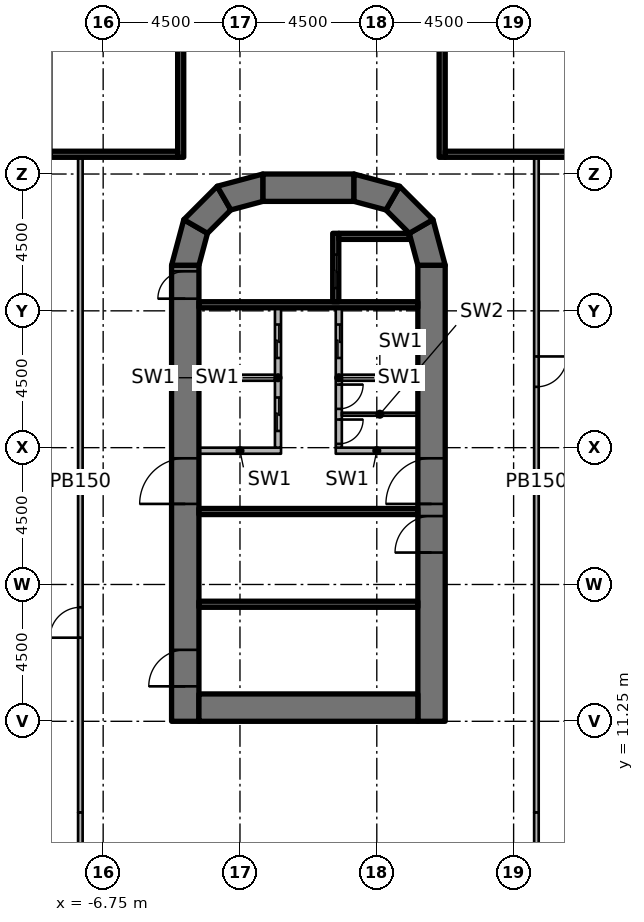
"""IFC4 building model, lengths in metres.
Left out: names, types, materials, properties, quantities, classifications, styles, units other than length and angle.
Written with IfcOpenShell. Run it as: python <this file> out.ifc"""

import sys

from ifc_helpers import new_model, si_unit, direction, frame, frame_2d, origin, origin_2d, place, context, subcontext, project, spatial, polyline, rectangle, outline, extrude, element, fill, save


model = new_model("IFC4")
c1 = context("Model", 3, precision=1e-05, world=origin(), true_north=direction((0.0, 1.0)))
c2 = subcontext(c1, "Body", "Model", "MODEL_VIEW")
j1 = project(units=[si_unit("LENGTHUNIT", "METRE"), si_unit("PLANEANGLEUNIT", "RADIAN")], contexts=[c1])
p1 = place(None, origin())
s1 = spatial("IfcSite", under=j1, at=p1, CompositionType="ELEMENT")
p2 = place(p1, origin())
s2 = spatial("IfcBuilding", under=s1, at=p2, CompositionType="ELEMENT")
p3 = place(p2, frame((0.0, 0.0, 7.0)))
s3 = spatial("IfcBuildingStorey", under=s2, at=p3, CompositionType="ELEMENT", Elevation=7.0)
for number, where, z_axis, x_axis in (
    (1, (-6.25, 10.75, 0.0), (0.0, 0.0, 1.0), (1.0, 0.0, 0.0)),
    (2, (-6.25, 15.75, 0.0), (0.0, 0.0, 1.0), (1.0, 0.0, 0.0)),
    (3, (-6.25, 20.25, 0.0), (0.0, 0.0, 1.0), (1.0, 0.0, 0.0)),
    (4, (-6.25, 24.65, 0.0), (0.0, 0.0, 1.0), (1.0, 0.0, 0.0)),
    (5, (-6.25, 26.7, 0.0), (0.0, 0.0, 1.0), (1.0, 0.0, 0.0)),
    (6, (-2.25, 33.11, 0.0), (0.0, 0.0, 1.0), (1.0, 0.0, 0.0)),
    (7, (2.25, 33.11, 0.0), (0.0, 0.0, 1.0), (1.0, 0.0, 0.0)),
    (8, (6.25, 10.75, 0.0), (0.0, 0.0, 1.0), (1.0, 0.0, 0.0)),
    (9, (6.25, 15.75, 0.0), (0.0, 0.0, 1.0), (1.0, 0.0, 0.0)),
    (10, (6.25, 20.25, 0.0), (0.0, 0.0, 1.0), (1.0, 0.0, 0.0)),
    (11, (6.25, 24.65, 0.0), (0.0, 0.0, 1.0), (1.0, 0.0, 0.0)),
    (12, (6.25, 26.7, 0.0), (0.0, 0.0, 1.0), (1.0, 0.0, 0.0)),
):
    element("IfcColumn", number, at=place(p3, frame(where, z_axis=z_axis, x_axis=x_axis)), inside=s3, PredefinedType="COLUMN", context=c2, shape_type="SweptSolid", body=[
        extrude(rectangle(XDim=1.2, YDim=1.2, at=origin_2d()), origin(), (0.0, 0.0, 1.0), 4.55),
    ])
p4 = place(p3, frame((-4.05, 11.25, 0.0), z_axis=(0.0, 0.0, 1.0), x_axis=(0.0, 1.0, 0.0)))
e13 = element("IfcWall", 13, at=p4, inside=s3, PredefinedType="SHEAR", context=c2, shape_type="SweptSolid", body=[
    extrude(rectangle(XDim=15.0, YDim=0.9, at=frame_2d((7.5, 0.0))), origin(), (0.0, 0.0, 1.0), 5.0),
])
p5 = place(p4, frame((7.15, 0.0, 0.0)))
e14 = element("IfcOpeningElement", 14, at=p5, cuts=e13, PredefinedType="OPENING", context=c2, shape_type="SweptSolid", body=[
    extrude(rectangle(XDim=1.5, YDim=2.3, at=frame_2d((0.75, 1.15))), frame((0.0, 0.46, 0.0), z_axis=(0.0, -1.0, 0.0), x_axis=(1.0, 0.0, 0.0)), (0.0, 0.0, 1.0), 0.92),
])
p6 = place(p4, frame((13.9, 0.0, 0.0)))
e15 = element("IfcOpeningElement", 15, at=p6, cuts=e13, PredefinedType="OPENING", context=c2, shape_type="SweptSolid", body=[
    extrude(rectangle(XDim=0.9, YDim=2.1, at=frame_2d((0.45, 1.05))), frame((0.0, 0.46, 0.0), z_axis=(0.0, -1.0, 0.0), x_axis=(1.0, 0.0, 0.0)), (0.0, 0.0, 1.0), 0.92),
])
p7 = place(p4, frame((1.15, 0.0, 0.0)))
e16 = element("IfcOpeningElement", 16, at=p7, cuts=e13, PredefinedType="OPENING", context=c2, shape_type="SweptSolid", body=[
    extrude(rectangle(XDim=1.2, YDim=2.1, at=frame_2d((0.6, 1.05))), frame((0.0, 0.46, 0.0), z_axis=(0.0, -1.0, 0.0), x_axis=(1.0, 0.0, 0.0)), (0.0, 0.0, 1.0), 0.92),
])
p8 = place(p3, frame((4.05, 11.25, 0.0), z_axis=(0.0, 0.0, 1.0), x_axis=(0.0, 1.0, 0.0)))
e17 = element("IfcWall", 17, at=p8, inside=s3, PredefinedType="SHEAR", context=c2, shape_type="SweptSolid", body=[
    extrude(rectangle(XDim=15.0, YDim=0.9, at=frame_2d((7.5, 0.0))), origin(), (0.0, 0.0, 1.0), 5.0),
])
p9 = place(p8, frame((7.15, 0.0, 0.0)))
e18 = element("IfcOpeningElement", 18, at=p9, cuts=e17, PredefinedType="OPENING", context=c2, shape_type="SweptSolid", body=[
    extrude(rectangle(XDim=1.5, YDim=2.3, at=frame_2d((0.75, 1.15))), frame((0.0, 0.46, 0.0), z_axis=(0.0, -1.0, 0.0), x_axis=(1.0, 0.0, 0.0)), (0.0, 0.0, 1.0), 0.92),
])
p10 = place(p8, frame((5.55, 0.0, 0.0)))
e19 = element("IfcOpeningElement", 19, at=p10, cuts=e17, PredefinedType="OPENING", context=c2, shape_type="SweptSolid", body=[
    extrude(rectangle(XDim=1.2, YDim=2.1, at=frame_2d((0.6, 1.05))), frame((0.0, 0.46, 0.0), z_axis=(0.0, -1.0, 0.0), x_axis=(1.0, 0.0, 0.0)), (0.0, 0.0, 1.0), 0.92),
])
p11 = place(p3, frame((-3.6, 11.7, 0.0), z_axis=(0.0, 0.0, 1.0), x_axis=(1.0, 0.0, 0.0)))
e20 = element("IfcWall", 20, at=p11, inside=s3, PredefinedType="SHEAR", context=c2, shape_type="SweptSolid", body=[
    extrude(rectangle(XDim=7.2, YDim=0.9, at=frame_2d((3.6, 0.0))), origin(), (0.0, 0.0, 1.0), 5.0),
])
p12 = place(p3, frame((-1.5, 28.8, 0.0), z_axis=(0.0, 0.0, 1.0), x_axis=(1.0, 0.0, 0.0)))
e21 = element("IfcWall", 21, at=p12, inside=s3, PredefinedType="SHEAR", context=c2, shape_type="SweptSolid", body=[
    extrude(rectangle(XDim=3.0, YDim=0.9, at=frame_2d((1.5, 0.0))), origin(), (0.0, 0.0, 1.0), 5.0),
])
p13 = place(p3, origin())
e22 = element("IfcWall", 22, at=p13, inside=s3, PredefinedType="SHEAR", context=c2, shape_type="SweptSolid", body=[
    extrude(outline(polyline([(-4.5, 26.25), (-4.098, 27.75), (-3.319, 27.3), (-3.6, 26.25), (-4.5, 26.25)])), origin(), (0.0, 0.0, 1.0), 5.0),
])
p14 = place(p3, origin())
e23 = element("IfcWall", 23, at=p14, inside=s3, PredefinedType="SHEAR", context=c2, shape_type="SweptSolid", body=[
    extrude(outline(polyline([(-4.098, 27.75), (-3.0, 28.848), (-2.55, 28.069), (-3.319, 27.3), (-4.098, 27.75)])), origin(), (0.0, 0.0, 1.0), 5.0),
])
p15 = place(p3, origin())
e24 = element("IfcWall", 24, at=p15, inside=s3, PredefinedType="SHEAR", context=c2, shape_type="SweptSolid", body=[
    extrude(outline(polyline([(-3.0, 28.848), (-1.5, 29.25), (-1.5, 28.35), (-2.55, 28.069), (-3.0, 28.848)])), origin(), (0.0, 0.0, 1.0), 5.0),
])
p16 = place(p3, origin())
e25 = element("IfcWall", 25, at=p16, inside=s3, PredefinedType="SHEAR", context=c2, shape_type="SweptSolid", body=[
    extrude(outline(polyline([(4.5, 26.25), (4.098, 27.75), (3.319, 27.3), (3.6, 26.25), (4.5, 26.25)])), origin(), (0.0, 0.0, 1.0), 5.0),
])
p17 = place(p3, origin())
e26 = element("IfcWall", 26, at=p17, inside=s3, PredefinedType="SHEAR", context=c2, shape_type="SweptSolid", body=[
    extrude(outline(polyline([(4.098, 27.75), (3.0, 28.848), (2.55, 28.069), (3.319, 27.3), (4.098, 27.75)])), origin(), (0.0, 0.0, 1.0), 5.0),
])
p18 = place(p3, origin())
e27 = element("IfcWall", 27, at=p18, inside=s3, PredefinedType="SHEAR", context=c2, shape_type="SweptSolid", body=[
    extrude(outline(polyline([(3.0, 28.848), (1.5, 29.25), (1.5, 28.35), (2.55, 28.069), (3.0, 28.848)])), origin(), (0.0, 0.0, 1.0), 5.0),
])
p19 = place(p3, frame((-3.6, 24.95, 0.0), z_axis=(0.0, 0.0, 1.0), x_axis=(1.0, 0.0, 0.0)))
e28 = element("IfcWall", 28, at=p19, inside=s3, PredefinedType="SHEAR", context=c2, shape_type="SweptSolid", body=[
    extrude(rectangle(XDim=7.2, YDim=0.2, at=frame_2d((3.6, 0.0))), origin(), (0.0, 0.0, 1.0), 4.55),
])
p20 = place(p3, frame((0.9, 27.3, 0.0), z_axis=(0.0, 0.0, 1.0), x_axis=(0.0, -1.0, 0.0)))
e29 = element("IfcWall", 29, at=p20, inside=s3, PredefinedType="SHEAR", context=c2, shape_type="SweptSolid", body=[
    extrude(rectangle(XDim=2.25, YDim=0.2, at=frame_2d((1.125, 0.0))), origin(), (0.0, 0.0, 1.0), 4.55),
])
p21 = place(p20, frame((0.7, 0.0, 0.0)))
e30 = element("IfcOpeningElement", 30, at=p21, cuts=e29, PredefinedType="OPENING", context=c2, shape_type="SweptSolid", body=[
    extrude(rectangle(XDim=1.1, YDim=2.3, at=frame_2d((0.55, 1.15))), frame((0.0, 0.11, 0.0), z_axis=(0.0, -1.0, 0.0), x_axis=(1.0, 0.0, 0.0)), (0.0, 0.0, 1.0), 0.22),
])
p22 = place(p3, origin())
e31 = element("IfcWall", 31, at=p22, inside=s3, PredefinedType="SHEAR", context=c2, shape_type="SweptSolid", body=[
    extrude(outline(polyline([(1.0, 27.1), (3.341, 27.1), (3.291, 27.284), (3.275, 27.3), (1.0, 27.3), (1.0, 27.1)])), origin(), (0.0, 0.0, 1.0), 4.55),
])
for number, where, z_axis, x_axis in (
    (32, (-3.6, 18.15, 0.0), (0.0, 0.0, 1.0), (1.0, 0.0, 0.0)),
    (33, (-3.6, 15.1, 0.0), (0.0, 0.0, 1.0), (1.0, 0.0, 0.0)),
):
    element("IfcWall", number, at=place(p3, frame(where, z_axis=z_axis, x_axis=x_axis)), inside=s3, PredefinedType="SHEAR", context=c2, shape_type="SweptSolid", body=[
        extrude(rectangle(XDim=7.2, YDim=0.2, at=frame_2d((3.6, 0.0))), origin(), (0.0, 0.0, 1.0), 4.55),
    ])
p23 = place(p3, frame((-3.6, 20.15, 0.0), z_axis=(0.0, 0.0, 1.0), x_axis=(1.0, 0.0, 0.0)))
e34 = element("IfcWall", 34, at=p23, inside=s3, PredefinedType="PARTITIONING", context=c2, shape_type="SweptSolid", body=[
    extrude(rectangle(XDim=2.7, YDim=0.2, at=frame_2d((1.35, 0.0))), origin(), (0.0, 0.0, 1.0), 4.55),
])
p24 = place(p3, frame((-1.0, 24.85, 0.0), z_axis=(0.0, 0.0, 1.0), x_axis=(0.0, -1.0, 0.0)))
e35 = element("IfcWall", 35, at=p24, inside=s3, PredefinedType="PARTITIONING", context=c2, shape_type="SweptSolid", body=[
    extrude(rectangle(XDim=4.6, YDim=0.2, at=frame_2d((2.3, 0.0))), origin(), (0.0, 0.0, 1.0), 4.55),
])
p25 = place(p24, frame((0.55, 0.0, 0.0)))
e36 = element("IfcOpeningElement", 36, at=p25, cuts=e35, PredefinedType="OPENING", context=c2, shape_type="SweptSolid", body=[
    extrude(rectangle(XDim=1.1, YDim=2.3, at=frame_2d((0.55, 1.15))), frame((0.0, 0.11, 0.0), z_axis=(0.0, -1.0, 0.0), x_axis=(1.0, 0.0, 0.0)), (0.0, 0.0, 1.0), 0.22),
])
p26 = place(p24, frame((2.95, 0.0, 0.0)))
e37 = element("IfcOpeningElement", 37, at=p26, cuts=e35, PredefinedType="OPENING", context=c2, shape_type="SweptSolid", body=[
    extrude(rectangle(XDim=1.1, YDim=2.3, at=frame_2d((0.55, 1.15))), frame((0.0, 0.11, 0.0), z_axis=(0.0, -1.0, 0.0), x_axis=(1.0, 0.0, 0.0)), (0.0, 0.0, 1.0), 0.22),
])
p27 = place(p3, frame((0.9, 20.15, 0.0), z_axis=(0.0, 0.0, 1.0), x_axis=(1.0, 0.0, 0.0)))
e38 = element("IfcWall", 38, at=p27, inside=s3, PredefinedType="PARTITIONING", context=c2, shape_type="SweptSolid", body=[
    extrude(rectangle(XDim=2.7, YDim=0.2, at=frame_2d((1.35, 0.0))), origin(), (0.0, 0.0, 1.0), 4.55),
])
p28 = place(p3, frame((1.0, 24.85, 0.0), z_axis=(0.0, 0.0, 1.0), x_axis=(0.0, -1.0, 0.0)))
e39 = element("IfcWall", 39, at=p28, inside=s3, PredefinedType="PARTITIONING", context=c2, shape_type="SweptSolid", body=[
    extrude(rectangle(XDim=4.6, YDim=0.2, at=frame_2d((2.3, 0.0))), origin(), (0.0, 0.0, 1.0), 4.55),
])
p29 = place(p28, frame((0.55, 0.0, 0.0)))
e40 = element("IfcOpeningElement", 40, at=p29, cuts=e39, PredefinedType="OPENING", context=c2, shape_type="SweptSolid", body=[
    extrude(rectangle(XDim=1.1, YDim=2.3, at=frame_2d((0.55, 1.15))), frame((0.0, 0.11, 0.0), z_axis=(0.0, -1.0, 0.0), x_axis=(1.0, 0.0, 0.0)), (0.0, 0.0, 1.0), 0.22),
])
p30 = place(p28, frame((2.525, 0.0, 0.0)))
e41 = element("IfcOpeningElement", 41, at=p30, cuts=e39, PredefinedType="OPENING", context=c2, shape_type="SweptSolid", body=[
    extrude(rectangle(XDim=0.8, YDim=2.1, at=frame_2d((0.4, 1.05))), frame((0.0, 0.11, 0.0), z_axis=(0.0, -1.0, 0.0), x_axis=(1.0, 0.0, 0.0)), (0.0, 0.0, 1.0), 0.22),
])
p31 = place(p28, frame((3.675, 0.0, 0.0)))
e42 = element("IfcOpeningElement", 42, at=p31, cuts=e39, PredefinedType="OPENING", context=c2, shape_type="SweptSolid", body=[
    extrude(rectangle(XDim=0.8, YDim=2.1, at=frame_2d((0.4, 1.05))), frame((0.0, 0.11, 0.0), z_axis=(0.0, -1.0, 0.0), x_axis=(1.0, 0.0, 0.0)), (0.0, 0.0, 1.0), 0.22),
])
for number, where, z_axis, x_axis in (
    (43, (-3.6, 22.55, 0.0), (0.0, 0.0, 1.0), (1.0, 0.0, 0.0)),
    (44, (1.1, 22.55, 0.0), (0.0, 0.0, 1.0), (1.0, 0.0, 0.0)),
):
    element("IfcWall", number, at=place(p3, frame(where, z_axis=z_axis, x_axis=x_axis)), inside=s3, PredefinedType="PARTITIONING", context=c2, shape_type="SweptSolid", body=[
        extrude(rectangle(XDim=2.5, YDim=0.2, at=frame_2d((1.25, 0.0))), origin(), (0.0, 0.0, 1.0), 4.55),
    ])
p32 = place(p3, frame((1.1, 21.35, 0.0), z_axis=(0.0, 0.0, 1.0), x_axis=(1.0, 0.0, 0.0)))
e45 = element("IfcWall", 45, at=p32, inside=s3, PredefinedType="PARTITIONING", context=c2, shape_type="SweptSolid", body=[
    extrude(rectangle(XDim=2.5, YDim=0.1, at=frame_2d((1.25, 0.0))), origin(), (0.0, 0.0, 1.0), 4.55),
])
p33 = place(p3, frame((-4.2, 29.8, 0.0), z_axis=(0.0, 0.0, 1.0), x_axis=(0.0, 1.0, 0.0)))
e46 = element("IfcWall", 46, at=p33, inside=s3, PredefinedType="SHEAR", context=c2, shape_type="SweptSolid", body=[
    extrude(rectangle(XDim=8.0, YDim=0.2, at=frame_2d((4.0, 0.0))), origin(), (0.0, 0.0, 1.0), 4.55),
])
p34 = place(p33, frame((6.3, 0.0, 0.0)))
e47 = element("IfcOpeningElement", 47, at=p34, cuts=e46, PredefinedType="OPENING", context=c2, shape_type="SweptSolid", body=[
    extrude(rectangle(XDim=1.2, YDim=2.1, at=frame_2d((0.6, 1.05))), frame((0.0, 0.11, 0.0), z_axis=(0.0, -1.0, 0.0), x_axis=(1.0, 0.0, 0.0)), (0.0, 0.0, 1.0), 0.22),
])
p35 = place(p3, frame((-8.5, 29.9, 0.0), z_axis=(0.0, 0.0, 1.0), x_axis=(1.0, 0.0, 0.0)))
e48 = element("IfcWall", 48, at=p35, inside=s3, PredefinedType="SHEAR", context=c2, shape_type="SweptSolid", body=[
    extrude(rectangle(XDim=4.2, YDim=0.2, at=frame_2d((2.1, 0.0))), origin(), (0.0, 0.0, 1.0), 4.55),
])
p36 = place(p3, frame((4.4, 29.8, 0.0), z_axis=(0.0, 0.0, 1.0), x_axis=(0.0, 1.0, 0.0)))
e49 = element("IfcWall", 49, at=p36, inside=s3, PredefinedType="SHEAR", context=c2, shape_type="SweptSolid", body=[
    extrude(rectangle(XDim=8.0, YDim=0.2, at=frame_2d((4.0, 0.0))), origin(), (0.0, 0.0, 1.0), 4.55),
])
p37 = place(p36, frame((6.3, 0.0, 0.0)))
e50 = element("IfcOpeningElement", 50, at=p37, cuts=e49, PredefinedType="OPENING", context=c2, shape_type="SweptSolid", body=[
    extrude(rectangle(XDim=1.2, YDim=2.1, at=frame_2d((0.6, 1.05))), frame((0.0, 0.11, 0.0), z_axis=(0.0, -1.0, 0.0), x_axis=(1.0, 0.0, 0.0)), (0.0, 0.0, 1.0), 0.22),
])
p38 = place(p3, frame((4.5, 29.9, 0.0), z_axis=(0.0, 0.0, 1.0), x_axis=(1.0, 0.0, 0.0)))
e51 = element("IfcWall", 51, at=p38, inside=s3, PredefinedType="SHEAR", context=c2, shape_type="SweptSolid", body=[
    extrude(rectangle(XDim=4.2, YDim=0.2, at=frame_2d((2.1, 0.0))), origin(), (0.0, 0.0, 1.0), 4.55),
])
p39 = place(p3, frame((7.5, 30.0, 0.0), z_axis=(0.0, 0.0, 1.0), x_axis=(0.0, -1.0, 0.0)))
e52 = element("IfcWall", 52, at=p39, inside=s3, PredefinedType="PARTITIONING", context=c2, shape_type="SweptSolid", body=[
    extrude(rectangle(XDim=21.75, YDim=0.15, at=frame_2d((10.875, 0.0))), origin(), (0.0, 0.0, 1.0), 4.55),
])
p40 = place(p39, frame((6.75, 0.0, 0.0)))
e53 = element("IfcOpeningElement", 53, at=p40, cuts=e52, PredefinedType="OPENING", context=c2, shape_type="SweptSolid", body=[
    extrude(rectangle(XDim=1.0, YDim=2.1, at=frame_2d((0.5, 1.05))), frame((0.0, 0.085, 0.0), z_axis=(0.0, -1.0, 0.0), x_axis=(1.0, 0.0, 0.0)), (0.0, 0.0, 1.0), 0.17),
])
p41 = place(p3, frame((-7.5, 8.25, 0.0), z_axis=(0.0, 0.0, 1.0), x_axis=(0.0, 1.0, 0.0)))
e54 = element("IfcWall", 54, at=p41, inside=s3, PredefinedType="PARTITIONING", context=c2, shape_type="SweptSolid", body=[
    extrude(rectangle(XDim=21.75, YDim=0.15, at=frame_2d((10.875, 0.0))), origin(), (0.0, 0.0, 1.0), 4.55),
])
p42 = place(p41, frame((5.75, 0.0, 0.0)))
e55 = element("IfcOpeningElement", 55, at=p42, cuts=e54, PredefinedType="OPENING", context=c2, shape_type="SweptSolid", body=[
    extrude(rectangle(XDim=1.0, YDim=2.1, at=frame_2d((0.5, 1.05))), frame((0.0, 0.085, 0.0), z_axis=(0.0, -1.0, 0.0), x_axis=(1.0, 0.0, 0.0)), (0.0, 0.0, 1.0), 0.17),
])
for number, where, z_axis, x_axis in (
    (56, (7.5, 1.65, 0.0), (0.0, 0.0, 1.0), (0.0, 1.0, 0.0)),
    (57, (-7.5, 8.25, 0.0), (0.0, 0.0, 1.0), (0.0, -1.0, 0.0)),
):
    element("IfcWall", number, at=place(p3, frame(where, z_axis=z_axis, x_axis=x_axis)), inside=s3, PredefinedType="PARTITIONING", context=c2, shape_type="SweptSolid", body=[
        extrude(rectangle(XDim=6.6, YDim=0.15, at=frame_2d((3.3, 0.0))), origin(), (0.0, 0.0, 1.0), 4.55),
    ])
p43 = place(p5, origin())
e58 = element("IfcDoor", 58, at=p43, inside=s3, OperationType="DOUBLE_DOOR_SINGLE_SWING", PredefinedType="DOOR", context=c2, shape_type="SweptSolid", body=[
    extrude(rectangle(XDim=1.5, YDim=2.3, at=frame_2d((0.75, 1.15))), frame((0.0, 0.025, 0.0), z_axis=(0.0, -1.0, 0.0), x_axis=(1.0, 0.0, 0.0)), (0.0, 0.0, 1.0), 0.05),
])
fill(e14, e58)
p44 = place(p9, origin())
e59 = element("IfcDoor", 59, at=p44, inside=s3, OperationType="DOUBLE_DOOR_SINGLE_SWING", PredefinedType="DOOR", context=c2, shape_type="SweptSolid", body=[
    extrude(rectangle(XDim=1.5, YDim=2.3, at=frame_2d((0.75, 1.15))), frame((0.0, 0.025, 0.0), z_axis=(0.0, -1.0, 0.0), x_axis=(1.0, 0.0, 0.0)), (0.0, 0.0, 1.0), 0.05),
])
fill(e18, e59)
p45 = place(p6, origin())
e60 = element("IfcDoor", 60, at=p45, inside=s3, OperationType="SINGLE_SWING_LEFT", PredefinedType="DOOR", context=c2, shape_type="SweptSolid", body=[
    extrude(rectangle(XDim=0.9, YDim=2.1, at=frame_2d((0.45, 1.05))), frame((0.0, 0.025, 0.0), z_axis=(0.0, -1.0, 0.0), x_axis=(1.0, 0.0, 0.0)), (0.0, 0.0, 1.0), 0.05),
])
fill(e15, e60)
p46 = place(p10, origin())
e61 = element("IfcDoor", 61, at=p46, inside=s3, OperationType="SINGLE_SWING_LEFT", PredefinedType="DOOR", context=c2, shape_type="SweptSolid", body=[
    extrude(rectangle(XDim=1.2, YDim=2.1, at=frame_2d((0.6, 1.05))), frame((0.0, 0.025, 0.0), z_axis=(0.0, -1.0, 0.0), x_axis=(1.0, 0.0, 0.0)), (0.0, 0.0, 1.0), 0.05),
])
fill(e19, e61)
p47 = place(p7, origin())
e62 = element("IfcDoor", 62, at=p47, inside=s3, OperationType="SINGLE_SWING_LEFT", PredefinedType="DOOR", context=c2, shape_type="SweptSolid", body=[
    extrude(rectangle(XDim=1.2, YDim=2.1, at=frame_2d((0.6, 1.05))), frame((0.0, 0.025, 0.0), z_axis=(0.0, -1.0, 0.0), x_axis=(1.0, 0.0, 0.0)), (0.0, 0.0, 1.0), 0.05),
])
fill(e16, e62)
p48 = place(p21, origin())
e63 = element("IfcDoor", 63, at=p48, inside=s3, OperationType="DOUBLE_DOOR_SLIDING", PredefinedType="DOOR", context=c2, shape_type="SweptSolid", body=[
    extrude(rectangle(XDim=1.1, YDim=2.3, at=frame_2d((0.55, 1.15))), frame((0.0, 0.025, 0.0), z_axis=(0.0, -1.0, 0.0), x_axis=(1.0, 0.0, 0.0)), (0.0, 0.0, 1.0), 0.05),
])
fill(e30, e63)
p49 = place(p25, origin())
e64 = element("IfcDoor", 64, at=p49, inside=s3, OperationType="DOUBLE_DOOR_SLIDING", PredefinedType="DOOR", context=c2, shape_type="SweptSolid", body=[
    extrude(rectangle(XDim=1.1, YDim=2.3, at=frame_2d((0.55, 1.15))), frame((0.0, 0.025, 0.0), z_axis=(0.0, -1.0, 0.0), x_axis=(1.0, 0.0, 0.0)), (0.0, 0.0, 1.0), 0.05),
])
fill(e36, e64)
p50 = place(p26, origin())
e65 = element("IfcDoor", 65, at=p50, inside=s3, OperationType="DOUBLE_DOOR_SLIDING", PredefinedType="DOOR", context=c2, shape_type="SweptSolid", body=[
    extrude(rectangle(XDim=1.1, YDim=2.3, at=frame_2d((0.55, 1.15))), frame((0.0, 0.025, 0.0), z_axis=(0.0, -1.0, 0.0), x_axis=(1.0, 0.0, 0.0)), (0.0, 0.0, 1.0), 0.05),
])
fill(e37, e65)
p51 = place(p29, origin())
e66 = element("IfcDoor", 66, at=p51, inside=s3, OperationType="DOUBLE_DOOR_SLIDING", PredefinedType="DOOR", context=c2, shape_type="SweptSolid", body=[
    extrude(rectangle(XDim=1.1, YDim=2.3, at=frame_2d((0.55, 1.15))), frame((0.0, 0.025, 0.0), z_axis=(0.0, -1.0, 0.0), x_axis=(1.0, 0.0, 0.0)), (0.0, 0.0, 1.0), 0.05),
])
fill(e40, e66)
p52 = place(p30, origin())
e67 = element("IfcDoor", 67, at=p52, inside=s3, OperationType="SINGLE_SWING_RIGHT", PredefinedType="DOOR", context=c2, shape_type="SweptSolid", body=[
    extrude(rectangle(XDim=0.8, YDim=2.1, at=frame_2d((0.4, 1.05))), frame((0.0, 0.025, 0.0), z_axis=(0.0, -1.0, 0.0), x_axis=(1.0, 0.0, 0.0)), (0.0, 0.0, 1.0), 0.05),
])
fill(e41, e67)
p53 = place(p31, origin())
e68 = element("IfcDoor", 68, at=p53, inside=s3, OperationType="SINGLE_SWING_LEFT", PredefinedType="DOOR", context=c2, shape_type="SweptSolid", body=[
    extrude(rectangle(XDim=0.8, YDim=2.1, at=frame_2d((0.4, 1.05))), frame((0.0, 0.025, 0.0), z_axis=(0.0, -1.0, 0.0), x_axis=(1.0, 0.0, 0.0)), (0.0, 0.0, 1.0), 0.05),
])
fill(e42, e68)
p54 = place(p40, origin())
e69 = element("IfcDoor", 69, at=p54, inside=s3, OperationType="SINGLE_SWING_LEFT", PredefinedType="DOOR", context=c2, shape_type="SweptSolid", body=[
    extrude(rectangle(XDim=1.0, YDim=2.1, at=frame_2d((0.5, 1.05))), frame((0.0, 0.025, 0.0), z_axis=(0.0, -1.0, 0.0), x_axis=(1.0, 0.0, 0.0)), (0.0, 0.0, 1.0), 0.05),
])
fill(e53, e69)
p55 = place(p42, origin())
e70 = element("IfcDoor", 70, at=p55, inside=s3, OperationType="SINGLE_SWING_LEFT", PredefinedType="DOOR", context=c2, shape_type="SweptSolid", body=[
    extrude(rectangle(XDim=1.0, YDim=2.1, at=frame_2d((0.5, 1.05))), frame((0.0, 0.025, 0.0), z_axis=(0.0, -1.0, 0.0), x_axis=(1.0, 0.0, 0.0)), (0.0, 0.0, 1.0), 0.05),
])
fill(e55, e70)
save(model, sys.argv[1])
